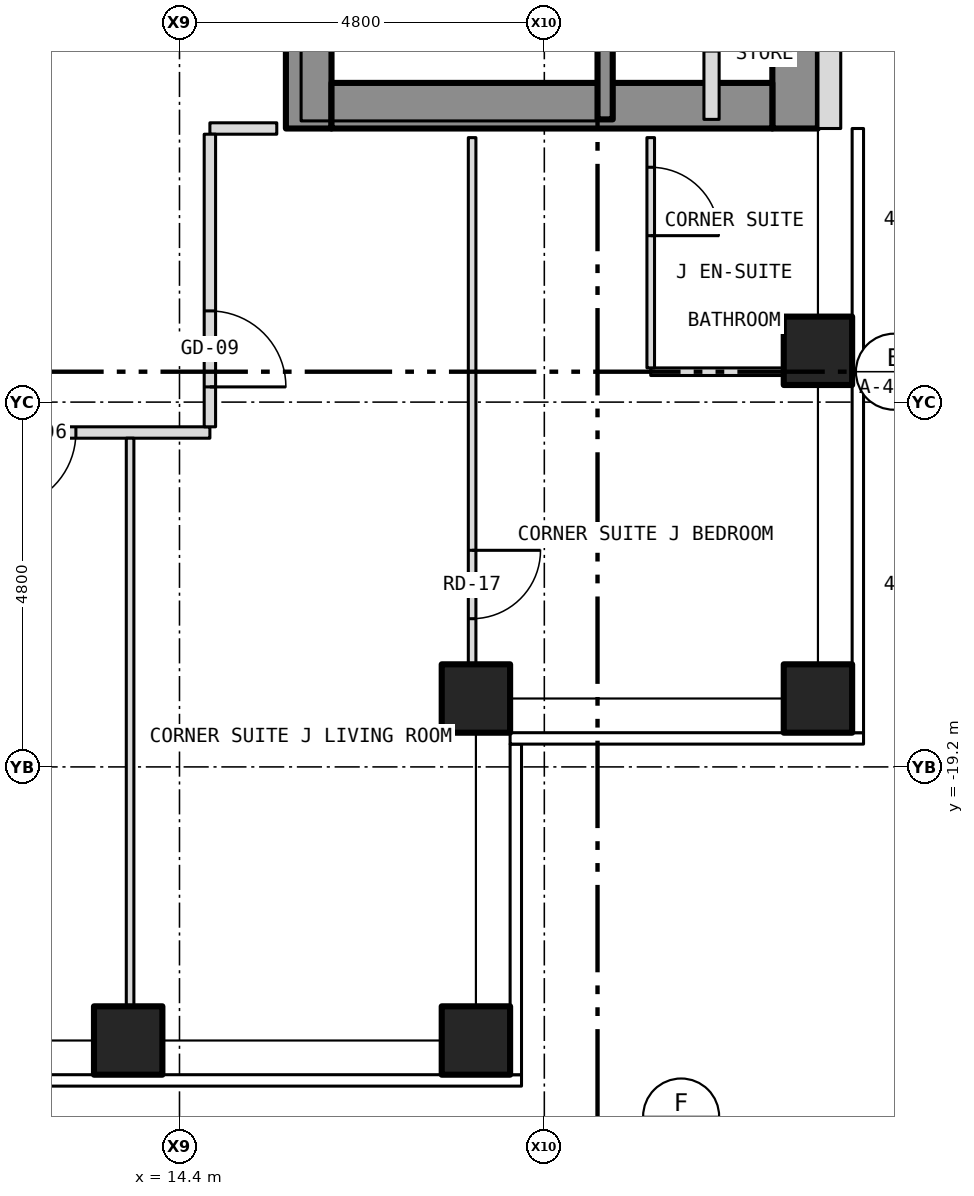
"""IFC4 building model, lengths in metres.
Left out: names, types, materials, properties, quantities, classifications, styles, units other than length and angle.
Written with IfcOpenShell. Run it as: python <this file> out.ifc"""

import sys

from ifc_helpers import new_model, si_unit, direction, frame, frame_2d, origin, origin_2d, place, context, subcontext, project, spatial, rectangle, hollow_rectangle, extrude, element, fill, save


model = new_model("IFC4")
c1 = context("Model", 3, precision=1e-05, world=origin(), true_north=direction((0.0, 1.0)))
c2 = subcontext(c1, "Body", "Model", "MODEL_VIEW")
j1 = project(units=[si_unit("LENGTHUNIT", "METRE"), si_unit("PLANEANGLEUNIT", "RADIAN")], contexts=[c1])
p1 = place(None, origin())
s1 = spatial("IfcSite", under=j1, at=p1, CompositionType="ELEMENT")
p2 = place(p1, origin())
s2 = spatial("IfcBuilding", under=s1, at=p2, CompositionType="ELEMENT")
p3 = place(p2, frame((0.0, 0.0, 110.0)))
s3 = spatial("IfcBuildingStorey", under=s2, at=p3, CompositionType="ELEMENT", Elevation=110.0)
for number, where, z_axis, x_axis in (
    (1, (13.725, -22.8, -0.15), (0.0, 0.0, 1.0), (1.0, 0.0, 0.0)),
    (2, (18.3, -22.8, -0.15), (0.0, 0.0, 1.0), (1.0, 0.0, 0.0)),
    (3, (22.8, -18.3, -0.15), (0.0, 0.0, 1.0), (1.0, 0.0, 0.0)),
    (4, (22.8, -13.725, -0.15), (0.0, 0.0, 1.0), (1.0, 0.0, 0.0)),
    (5, (18.3, -18.3, -0.15), (0.0, 0.0, 1.0), (1.0, 0.0, 0.0)),
):
    element("IfcColumn", number, at=place(p3, frame(where, z_axis=z_axis, x_axis=x_axis)), inside=s3, PredefinedType="COLUMN", context=c2, shape_type="SweptSolid", body=[
        extrude(hollow_rectangle(XDim=0.9, YDim=0.9, WallThickness=0.05, at=origin_2d()), origin(), (0.0, 0.0, 1.0), 3.5),
    ])
p4 = place(p3, frame((16.1, -10.8, 0.0), z_axis=(0.0, 0.0, 1.0), x_axis=(0.0, 1.0, 0.0)))
e6 = element("IfcWall", 6, at=p4, inside=s3, PredefinedType="SHEAR", context=c2, shape_type="SweptSolid", body=[
    extrude(rectangle(XDim=21.6, YDim=0.6, at=frame_2d((10.8, 0.0))), origin(), (0.0, 0.0, 1.0), 3.25),
])
p5 = place(p4, frame((9.4, 0.0, 0.0)))
e7 = element("IfcOpeningElement", 7, at=p5, cuts=e6, PredefinedType="OPENING", context=c2, shape_type="SweptSolid", body=[
    extrude(rectangle(XDim=1.1, YDim=2.1, at=frame_2d((0.55, 1.05))), frame((0.0, 0.312, 0.0), z_axis=(0.0, -1.0, 0.0), x_axis=(1.0, 0.0, 0.0)), (0.0, 0.0, 1.0), 0.624),
])
p6 = place(p4, frame((11.5, 0.0, 0.0)))
e8 = element("IfcOpeningElement", 8, at=p6, cuts=e6, PredefinedType="OPENING", context=c2, shape_type="SweptSolid", body=[
    extrude(rectangle(XDim=1.1, YDim=2.1, at=frame_2d((0.55, 1.05))), frame((0.0, 0.312, 0.0), z_axis=(0.0, -1.0, 0.0), x_axis=(1.0, 0.0, 0.0)), (0.0, 0.0, 1.0), 0.624),
])
p7 = place(p4, frame((13.6, 0.0, 0.0)))
e9 = element("IfcOpeningElement", 9, at=p7, cuts=e6, PredefinedType="OPENING", context=c2, shape_type="SweptSolid", body=[
    extrude(rectangle(XDim=1.1, YDim=2.1, at=frame_2d((0.55, 1.05))), frame((0.0, 0.312, 0.0), z_axis=(0.0, -1.0, 0.0), x_axis=(1.0, 0.0, 0.0)), (0.0, 0.0, 1.0), 0.624),
])
p8 = place(p4, frame((15.7, 0.0, 0.0)))
e10 = element("IfcOpeningElement", 10, at=p8, cuts=e6, PredefinedType="OPENING", context=c2, shape_type="SweptSolid", body=[
    extrude(rectangle(XDim=1.1, YDim=2.1, at=frame_2d((0.55, 1.05))), frame((0.0, 0.312, 0.0), z_axis=(0.0, -1.0, 0.0), x_axis=(1.0, 0.0, 0.0)), (0.0, 0.0, 1.0), 0.624),
])
p9 = place(p4, frame((17.8, 0.0, 0.0)))
e11 = element("IfcOpeningElement", 11, at=p9, cuts=e6, PredefinedType="OPENING", context=c2, shape_type="SweptSolid", body=[
    extrude(rectangle(XDim=1.1, YDim=2.1, at=frame_2d((0.55, 1.05))), frame((0.0, 0.312, 0.0), z_axis=(0.0, -1.0, 0.0), x_axis=(1.0, 0.0, 0.0)), (0.0, 0.0, 1.0), 0.624),
])
p10 = place(p4, frame((5.642, 0.0, 0.0)))
e12 = element("IfcOpeningElement", 12, at=p10, cuts=e6, PredefinedType="OPENING", context=c2, shape_type="SweptSolid", body=[
    extrude(rectangle(XDim=1.1, YDim=2.1, at=frame_2d((0.55, 1.05))), frame((0.0, 0.312, 0.0), z_axis=(0.0, -1.0, 0.0), x_axis=(1.0, 0.0, 0.0)), (0.0, 0.0, 1.0), 0.624),
])
p11 = place(p4, frame((7.5, 0.0, 0.0)))
e13 = element("IfcOpeningElement", 13, at=p11, cuts=e6, PredefinedType="OPENING", context=c2, shape_type="SweptSolid", body=[
    extrude(rectangle(XDim=1.1, YDim=2.1, at=frame_2d((0.55, 1.05))), frame((0.0, 0.312, 0.0), z_axis=(0.0, -1.0, 0.0), x_axis=(1.0, 0.0, 0.0)), (0.0, 0.0, 1.0), 0.624),
])
p12 = place(p3, frame((22.5, -10.8, 0.0), z_axis=(0.0, 0.0, 1.0), x_axis=(0.0, 1.0, 0.0)))
e14 = element("IfcWall", 14, at=p12, inside=s3, PredefinedType="SHEAR", context=c2, shape_type="SweptSolid", body=[
    extrude(rectangle(XDim=21.6, YDim=0.6, at=frame_2d((10.8, 0.0))), origin(), (0.0, 0.0, 1.0), 3.25),
])
p13 = place(p3, frame((16.4, -10.5, 0.0), z_axis=(0.0, 0.0, 1.0), x_axis=(1.0, 0.0, 0.0)))
e15 = element("IfcWall", 15, at=p13, inside=s3, PredefinedType="SHEAR", context=c2, shape_type="SweptSolid", body=[
    extrude(rectangle(XDim=5.8, YDim=0.6, at=frame_2d((2.9, 0.0))), origin(), (0.0, 0.0, 1.0), 3.25),
])
p14 = place(p3, frame((22.95, -10.8, 0.0), z_axis=(0.0, 0.0, 1.0), x_axis=(0.0, 1.0, 0.0)))
e16 = element("IfcWall", 16, at=p14, inside=s3, PredefinedType="SOLIDWALL", context=c2, shape_type="SweptSolid", body=[
    extrude(rectangle(XDim=21.6, YDim=0.3, at=frame_2d((10.8, 0.0))), origin(), (0.0, 0.0, 1.0), 3.5),
])
p15 = place(p14, frame((2.95, 0.0, 1.0)))
e17 = element("IfcOpeningElement", 17, at=p15, cuts=e16, PredefinedType="OPENING", context=c2, shape_type="SweptSolid", body=[
    extrude(rectangle(XDim=0.6, YDim=1.5, at=frame_2d((0.3, 0.75))), frame((0.0, 0.162, 0.0), z_axis=(0.0, -1.0, 0.0), x_axis=(1.0, 0.0, 0.0)), (0.0, 0.0, 1.0), 0.324),
])
p16 = place(p3, frame((-14.8, -14.8, 0.0), z_axis=(0.0, 0.0, 1.0), x_axis=(1.0, 0.0, 0.0)))
e18 = element("IfcWall", 18, at=p16, inside=s3, PredefinedType="PARTITIONING", context=c2, shape_type="SweptSolid", body=[
    extrude(rectangle(XDim=29.6, YDim=0.15, at=frame_2d((14.8, 0.0))), origin(), (0.0, 0.0, 1.0), 3.35),
])
p17 = place(p16, frame((2.634, 0.0, 0.0)))
e19 = element("IfcOpeningElement", 19, at=p17, cuts=e18, PredefinedType="OPENING", context=c2, shape_type="SweptSolid", body=[
    extrude(rectangle(XDim=1.0, YDim=2.1, at=frame_2d((0.5, 1.05))), frame((0.0, 0.087, 0.0), z_axis=(0.0, -1.0, 0.0), x_axis=(1.0, 0.0, 0.0)), (0.0, 0.0, 1.0), 0.174),
])
p18 = place(p16, frame((20.362, 0.0, 0.0)))
e20 = element("IfcOpeningElement", 20, at=p18, cuts=e18, PredefinedType="OPENING", context=c2, shape_type="SweptSolid", body=[
    extrude(rectangle(XDim=1.0, YDim=2.1, at=frame_2d((0.5, 1.05))), frame((0.0, 0.087, 0.0), z_axis=(0.0, -1.0, 0.0), x_axis=(1.0, 0.0, 0.0)), (0.0, 0.0, 1.0), 0.174),
])
p19 = place(p16, frame((26.837, 0.0, 0.0)))
e21 = element("IfcOpeningElement", 21, at=p19, cuts=e18, PredefinedType="OPENING", context=c2, shape_type="SweptSolid", body=[
    extrude(rectangle(XDim=1.0, YDim=2.1, at=frame_2d((0.5, 1.05))), frame((0.0, 0.087, 0.0), z_axis=(0.0, -1.0, 0.0), x_axis=(1.0, 0.0, 0.0)), (0.0, 0.0, 1.0), 0.174),
])
p20 = place(p3, frame((20.6, -14.0, 0.0), z_axis=(0.0, 0.0, 1.0), x_axis=(1.0, 0.0, 0.0)))
e22 = element("IfcWall", 22, at=p20, inside=s3, PredefinedType="PARTITIONING", context=c2, shape_type="SweptSolid", body=[
    extrude(rectangle(XDim=2.08, YDim=0.1, at=frame_2d((1.04, 0.0))), origin(), (0.0, 0.0, 1.0), 3.35),
])
p21 = place(p3, frame((14.8, -10.8, 0.0), z_axis=(0.0, 0.0, 1.0), x_axis=(1.0, 0.0, 0.0)))
e23 = element("IfcWall", 23, at=p21, inside=s3, PredefinedType="PARTITIONING", context=c2, shape_type="SweptSolid", body=[
    extrude(rectangle(XDim=0.88, YDim=0.15, at=frame_2d((0.44, 0.0))), origin(), (0.0, 0.0, 1.0), 3.35),
])
p22 = place(p3, frame((13.75, -22.68, 0.0), z_axis=(0.0, 0.0, 1.0), x_axis=(0.0, 1.0, 0.0)))
e24 = element("IfcWall", 24, at=p22, inside=s3, PredefinedType="PARTITIONING", context=c2, shape_type="SweptSolid", body=[
    extrude(rectangle(XDim=7.805, YDim=0.1, at=frame_2d((3.902, 0.0))), origin(), (0.0, 0.0, 1.0), 3.35),
])
p23 = place(p3, frame((14.8, -14.725, 0.0), z_axis=(0.0, 0.0, 1.0), x_axis=(0.0, 1.0, 0.0)))
e25 = element("IfcWall", 25, at=p23, inside=s3, PredefinedType="PARTITIONING", context=c2, shape_type="SweptSolid", body=[
    extrude(rectangle(XDim=3.85, YDim=0.15, at=frame_2d((1.925, 0.0))), origin(), (0.0, 0.0, 1.0), 3.35),
])
p24 = place(p23, frame((0.525, 0.0, 0.0)))
e26 = element("IfcOpeningElement", 26, at=p24, cuts=e25, PredefinedType="OPENING", context=c2, shape_type="SweptSolid", body=[
    extrude(rectangle(XDim=1.0, YDim=2.1, at=frame_2d((0.5, 1.05))), frame((0.0, 0.087, 0.0), z_axis=(0.0, -1.0, 0.0), x_axis=(1.0, 0.0, 0.0)), (0.0, 0.0, 1.0), 0.174),
])
p25 = place(p3, frame((18.25, -18.191, 0.0), z_axis=(0.0, 0.0, 1.0), x_axis=(0.0, 1.0, 0.0)))
e27 = element("IfcWall", 27, at=p25, inside=s3, PredefinedType="PARTITIONING", context=c2, shape_type="SweptSolid", body=[
    extrude(rectangle(XDim=7.271, YDim=0.1, at=frame_2d((3.635, 0.0))), origin(), (0.0, 0.0, 1.0), 3.35),
])
p26 = place(p25, frame((0.941, 0.0, 0.0)))
e28 = element("IfcOpeningElement", 28, at=p26, cuts=e27, PredefinedType="OPENING", context=c2, shape_type="SweptSolid", body=[
    extrude(rectangle(XDim=0.9, YDim=2.1, at=frame_2d((0.45, 1.05))), frame((0.0, 0.062, 0.0), z_axis=(0.0, -1.0, 0.0), x_axis=(1.0, 0.0, 0.0)), (0.0, 0.0, 1.0), 0.124),
])
p27 = place(p3, frame((20.0, -10.68, 0.0), z_axis=(0.0, 0.0, 1.0), x_axis=(0.0, 1.0, 0.0)))
e29 = element("IfcWall", 29, at=p27, inside=s3, PredefinedType="SHEAR", context=c2, shape_type="SweptSolid", body=[
    extrude(rectangle(XDim=6.98, YDim=0.2, at=frame_2d((3.49, 0.0))), origin(), (0.0, 0.0, 1.0), 3.25),
])
p28 = place(p3, frame((20.6, -13.95, 0.0), z_axis=(0.0, 0.0, 1.0), x_axis=(0.0, 1.0, 0.0)))
e30 = element("IfcWall", 30, at=p28, inside=s3, PredefinedType="PARTITIONING", context=c2, shape_type="SweptSolid", body=[
    extrude(rectangle(XDim=3.03, YDim=0.1, at=frame_2d((1.515, 0.0))), origin(), (0.0, 0.0, 1.0), 3.35),
])
p29 = place(p28, frame((1.74, 0.0, 0.0)))
e31 = element("IfcOpeningElement", 31, at=p29, cuts=e30, PredefinedType="OPENING", context=c2, shape_type="SweptSolid", body=[
    extrude(rectangle(XDim=0.9, YDim=2.1, at=frame_2d((0.45, 1.05))), frame((0.0, 0.062, 0.0), z_axis=(0.0, -1.0, 0.0), x_axis=(1.0, 0.0, 0.0)), (0.0, 0.0, 1.0), 0.124),
])
p30 = place(p3, frame((21.4, -10.68, 0.0), z_axis=(0.0, 0.0, 1.0), x_axis=(0.0, 1.0, 0.0)))
e32 = element("IfcWall", 32, at=p30, inside=s3, PredefinedType="PARTITIONING", context=c2, shape_type="SweptSolid", body=[
    extrude(rectangle(XDim=8.68, YDim=0.2, at=frame_2d((4.34, 0.0))), origin(), (0.0, 0.0, 1.0), 3.25),
])
p31 = place(p30, frame((0.899, 0.0, 0.0)))
e33 = element("IfcOpeningElement", 33, at=p31, cuts=e32, PredefinedType="OPENING", context=c2, shape_type="SweptSolid", body=[
    extrude(rectangle(XDim=0.9, YDim=2.1, at=frame_2d((0.45, 1.05))), frame((0.0, 0.112, 0.0), z_axis=(0.0, -1.0, 0.0), x_axis=(1.0, 0.0, 0.0)), (0.0, 0.0, 1.0), 0.224),
])
p32 = place(p30, frame((3.88, 0.0, 0.0)))
e34 = element("IfcOpeningElement", 34, at=p32, cuts=e32, PredefinedType="OPENING", context=c2, shape_type="SweptSolid", body=[
    extrude(rectangle(XDim=0.9, YDim=2.1, at=frame_2d((0.45, 1.05))), frame((0.0, 0.112, 0.0), z_axis=(0.0, -1.0, 0.0), x_axis=(1.0, 0.0, 0.0)), (0.0, 0.0, 1.0), 0.224),
])
p33 = place(p30, frame((6.862, 0.0, 0.0)))
e35 = element("IfcOpeningElement", 35, at=p33, cuts=e32, PredefinedType="OPENING", context=c2, shape_type="SweptSolid", body=[
    extrude(rectangle(XDim=0.9, YDim=2.1, at=frame_2d((0.45, 1.05))), frame((0.0, 0.112, 0.0), z_axis=(0.0, -1.0, 0.0), x_axis=(1.0, 0.0, 0.0)), (0.0, 0.0, 1.0), 0.224),
])
p34 = place(p19, origin())
e36 = element("IfcDoor", 36, at=p34, inside=s3, OperationType="SINGLE_SWING_LEFT", PredefinedType="DOOR", context=c2, shape_type="SweptSolid", body=[
    extrude(rectangle(XDim=1.0, YDim=2.1, at=frame_2d((0.5, 1.05))), frame((0.0, 0.025, 0.0), z_axis=(0.0, -1.0, 0.0), x_axis=(1.0, 0.0, 0.0)), (0.0, 0.0, 1.0), 0.05),
])
fill(e21, e36)
p35 = place(p24, origin())
e37 = element("IfcDoor", 37, at=p35, inside=s3, OperationType="SINGLE_SWING_LEFT", PredefinedType="DOOR", context=c2, shape_type="SweptSolid", body=[
    extrude(rectangle(XDim=1.0, YDim=2.1, at=frame_2d((0.5, 1.05))), frame((0.0, 0.025, 0.0), z_axis=(0.0, -1.0, 0.0), x_axis=(1.0, 0.0, 0.0)), (0.0, 0.0, 1.0), 0.05),
])
fill(e26, e37)
p36 = place(p26, origin())
e38 = element("IfcDoor", 38, at=p36, inside=s3, OperationType="SINGLE_SWING_RIGHT", PredefinedType="DOOR", context=c2, shape_type="SweptSolid", body=[
    extrude(rectangle(XDim=0.9, YDim=2.1, at=frame_2d((0.45, 1.05))), frame((0.0, 0.025, 0.0), z_axis=(0.0, -1.0, 0.0), x_axis=(1.0, 0.0, 0.0)), (0.0, 0.0, 1.0), 0.05),
])
fill(e28, e38)
p37 = place(p29, origin())
e39 = element("IfcDoor", 39, at=p37, inside=s3, OperationType="SINGLE_SWING_LEFT", PredefinedType="DOOR", context=c2, shape_type="SweptSolid", body=[
    extrude(rectangle(XDim=0.9, YDim=2.1, at=frame_2d((0.45, 1.05))), frame((0.0, 0.025, 0.0), z_axis=(0.0, -1.0, 0.0), x_axis=(1.0, 0.0, 0.0)), (0.0, 0.0, 1.0), 0.05),
])
fill(e31, e39)
save(model, sys.argv[1])
